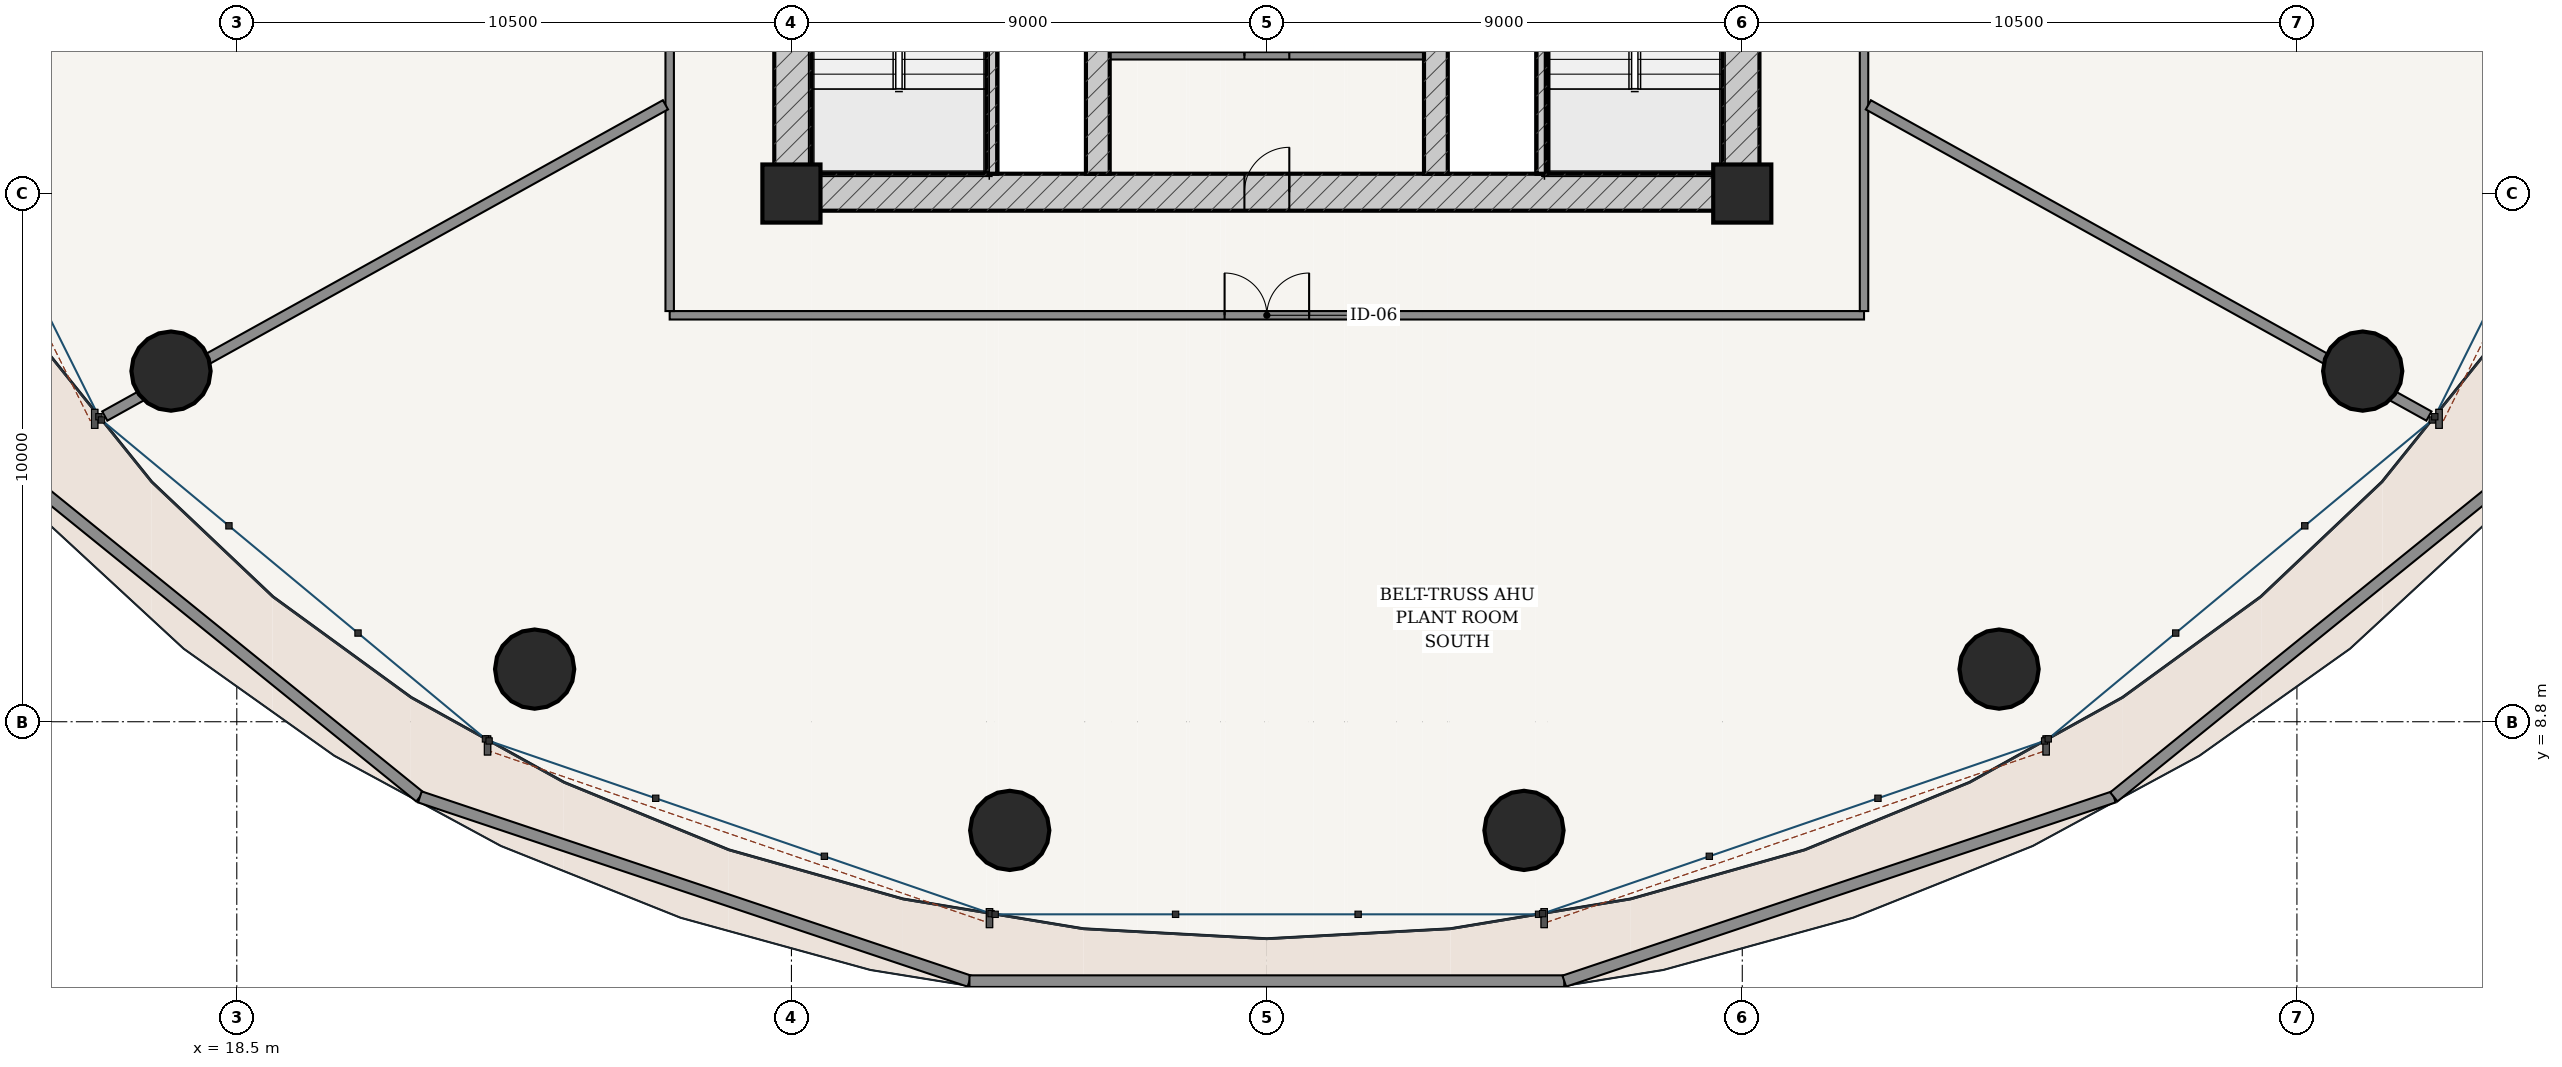
"""IFC4 building model, lengths in metres.
Left out: names, types, materials, properties, quantities, classifications, styles, units other than length and angle.
Written with IfcOpenShell. Run it as: python <this file> out.ifc"""

import sys

from ifc_helpers import new_model, si_unit, direction, frame, frame_2d, origin, origin_2d, place, context, subcontext, project, spatial, rectangle, hollow_circle, extrude, source, transform, mapped, element, fill, save


model = new_model("IFC4")
c1 = context("Model", 3, precision=1e-05, world=origin(), true_north=direction((-0.2419218956, 0.970295726276)))
c2 = subcontext(c1, "Body", "Model", "MODEL_VIEW")
j1 = project(units=[si_unit("LENGTHUNIT", "METRE"), si_unit("PLANEANGLEUNIT", "RADIAN")], contexts=[c1])
p1 = place(None, origin())
s1 = spatial("IfcSite", under=j1, at=p1, CompositionType="ELEMENT")
p2 = place(p1, origin())
s2 = spatial("IfcBuilding", under=s1, at=p2, CompositionType="ELEMENT")
p3 = place(p2, frame((0.0, 0.0, 74.4)))
s3 = spatial("IfcBuildingStorey", under=s2, at=p3, CompositionType="ELEMENT", Elevation=74.4)
for number, where, z_axis, x_axis in (
    (1, (29.0, 18.8, 0.0), (0.0, 0.0, 1.0), (1.0, 0.0, 0.0)),
    (2, (47.0, 18.8, 0.0), (0.0, 0.0, 1.0), (1.0, 0.0, 0.0)),
):
    element("IfcColumn", number, at=place(p3, frame(where, z_axis=z_axis, x_axis=x_axis)), inside=s3, PredefinedType="COLUMN", context=c2, shape_type="SweptSolid", body=[
        extrude(rectangle(XDim=1.1, YDim=1.1, at=origin_2d()), origin(), (0.0, 0.0, 1.0), 5.4),
    ])
p4 = place(p3, frame((28.675, 18.825, 0.0), z_axis=(0.0, 0.0, 1.0), x_axis=(1.0, 0.0, 0.0)))
e3 = element("IfcWall", 3, at=p4, inside=s3, PredefinedType="SHEAR", context=c2, shape_type="SweptSolid", body=[
    extrude(rectangle(XDim=18.65, YDim=0.7, at=frame_2d((9.325, 0.0))), origin(), (0.0, 0.0, 1.0), 5.125),
])
p5 = place(p4, frame((8.9, 0.0, 0.0)))
e4 = element("IfcOpeningElement", 4, at=p5, cuts=e3, PredefinedType="OPENING", context=c2, shape_type="SweptSolid", body=[
    extrude(rectangle(XDim=0.85, YDim=2.1, at=frame_2d((0.425, 1.05))), frame((0.0, 0.36, 0.0), z_axis=(0.0, -1.0, 0.0), x_axis=(1.0, 0.0, 0.0)), (0.0, 0.0, 1.0), 0.72),
])
p6 = place(p3, frame((29.025, 19.175, 0.0), z_axis=(0.0, 0.0, 1.0), x_axis=(0.0, 1.0, 0.0)))
e5 = element("IfcWall", 5, at=p6, inside=s3, PredefinedType="SHEAR", context=c2, shape_type="SweptSolid", body=[
    extrude(rectangle(XDim=15.25, YDim=0.7, at=frame_2d((7.625, 0.0))), origin(), (0.0, 0.0, 1.0), 5.125),
])
p7 = place(p6, frame((9.875, 0.0, 0.0)))
e6 = element("IfcOpeningElement", 6, at=p7, cuts=e5, PredefinedType="OPENING", context=c2, shape_type="SweptSolid", body=[
    extrude(rectangle(XDim=1.5, YDim=2.2, at=frame_2d((0.75, 1.1))), frame((0.0, 0.36, 0.0), z_axis=(0.0, -1.0, 0.0), x_axis=(1.0, 0.0, 0.0)), (0.0, 0.0, 1.0), 0.72),
])
p8 = place(p3, frame((46.975, 19.175, 0.0), z_axis=(0.0, 0.0, 1.0), x_axis=(0.0, 1.0, 0.0)))
e7 = element("IfcWall", 7, at=p8, inside=s3, PredefinedType="SHEAR", context=c2, shape_type="SweptSolid", body=[
    extrude(rectangle(XDim=15.25, YDim=0.7, at=frame_2d((7.625, 0.0))), origin(), (0.0, 0.0, 1.0), 5.125),
])
p9 = place(p8, frame((9.875, 0.0, 0.0)))
e8 = element("IfcOpeningElement", 8, at=p9, cuts=e7, PredefinedType="OPENING", context=c2, shape_type="SweptSolid", body=[
    extrude(rectangle(XDim=1.5, YDim=2.2, at=frame_2d((0.75, 1.1))), frame((0.0, 0.36, 0.0), z_axis=(0.0, -1.0, 0.0), x_axis=(1.0, 0.0, 0.0)), (0.0, 0.0, 1.0), 0.72),
])
for number, where, z_axis, x_axis in (
    (9, (32.795, 19.175, 0.0), (0.0, 0.0, 1.0), (0.0, 1.0, 0.0)),
    (10, (43.205, 19.175, 0.0), (0.0, 0.0, 1.0), (0.0, 1.0, 0.0)),
):
    element("IfcWall", number, at=place(p3, frame(where, z_axis=z_axis, x_axis=x_axis)), inside=s3, PredefinedType="SOLIDWALL", context=c2, shape_type="SweptSolid", body=[
        extrude(rectangle(XDim=7.375, YDim=0.2, at=frame_2d((3.688, 0.0))), origin(), (0.0, 0.0, 1.0), 5.125),
    ])
p10 = place(p3, frame((34.8, 19.175, 0.0), z_axis=(0.0, 0.0, 1.0), x_axis=(0.0, 1.0, 0.0)))
e11 = element("IfcWall", 11, at=p10, inside=s3, PredefinedType="SHEAR", context=c2, shape_type="SweptSolid", body=[
    extrude(rectangle(XDim=15.25, YDim=0.45, at=frame_2d((7.625, 0.0))), origin(), (0.0, 0.0, 1.0), 5.125),
])
p11 = place(p10, frame((7.8, 0.0, 0.0)))
e12 = element("IfcOpeningElement", 12, at=p11, cuts=e11, PredefinedType="OPENING", context=c2, shape_type="SweptSolid", body=[
    extrude(rectangle(XDim=1.05, YDim=2.15, at=frame_2d((0.525, 1.075))), frame((0.0, 0.235, 0.0), z_axis=(0.0, -1.0, 0.0), x_axis=(1.0, 0.0, 0.0)), (0.0, 0.0, 1.0), 0.47),
])
p12 = place(p3, frame((41.2, 19.175, 0.0), z_axis=(0.0, 0.0, 1.0), x_axis=(0.0, 1.0, 0.0)))
e13 = element("IfcWall", 13, at=p12, inside=s3, PredefinedType="SHEAR", context=c2, shape_type="SweptSolid", body=[
    extrude(rectangle(XDim=15.25, YDim=0.45, at=frame_2d((7.625, 0.0))), origin(), (0.0, 0.0, 1.0), 5.125),
])
p13 = place(p12, frame((7.8, 0.0, 0.0)))
e14 = element("IfcOpeningElement", 14, at=p13, cuts=e13, PredefinedType="OPENING", context=c2, shape_type="SweptSolid", body=[
    extrude(rectangle(XDim=1.05, YDim=2.15, at=frame_2d((0.525, 1.075))), frame((0.0, 0.235, 0.0), z_axis=(0.0, -1.0, 0.0), x_axis=(1.0, 0.0, 0.0)), (0.0, 0.0, 1.0), 0.47),
])
for number, where, z_axis, x_axis in (
    (15, (17.255, 15.438, 0.0), (0.0, 0.0, 1.0), (1.0, 0.0, 0.0)),
    (16, (24.138, 9.796, 0.0), (0.0, 0.0, 1.0), (1.0, 0.0, 0.0)),
    (17, (33.133, 6.743, 0.0), (0.0, 0.0, 1.0), (1.0, 0.0, 0.0)),
    (18, (42.867, 6.743, 0.0), (0.0, 0.0, 1.0), (1.0, 0.0, 0.0)),
    (19, (51.862, 9.796, 0.0), (0.0, 0.0, 1.0), (1.0, 0.0, 0.0)),
    (20, (58.745, 15.438, 0.0), (0.0, 0.0, 1.0), (1.0, 0.0, 0.0)),
):
    element("IfcColumn", number, at=place(p3, frame(where, z_axis=z_axis, x_axis=x_axis)), inside=s3, PredefinedType="COLUMN", context=c2, shape_type="SweptSolid", body=[
        extrude(hollow_circle(Radius=0.75, WallThickness=0.045, at=origin_2d()), origin(), (0.0, 0.0, 1.0), 5.4),
    ])
p14 = place(p3, frame((14.004, 13.822, 0.0), z_axis=(0.0, 0.0, 1.0), x_axis=(0.777289269967, -0.629143378567, 0.0)))
e21 = element("IfcWall", 21, at=p14, inside=s3, PredefinedType="PARAPET", context=c2, shape_type="SweptSolid", body=[
    extrude(rectangle(XDim=10.244, YDim=0.22, at=frame_2d((5.122, 0.0))), origin(), (0.0, 0.0, 1.0), 1.15),
])
p15 = place(p3, frame((21.966, 7.377, 0.0), z_axis=(0.0, 0.0, 1.0), x_axis=(0.948127810737, -0.317889374636, 0.0)))
e22 = element("IfcWall", 22, at=p15, inside=s3, PredefinedType="PARAPET", context=c2, shape_type="SweptSolid", body=[
    extrude(rectangle(XDim=10.972, YDim=0.22, at=frame_2d((5.486, 0.0))), origin(), (0.0, 0.0, 1.0), 1.15),
])
p16 = place(p3, frame((32.37, 3.889, 0.0), z_axis=(0.0, 0.0, 1.0), x_axis=(1.0, 0.0, 0.0)))
e23 = element("IfcWall", 23, at=p16, inside=s3, PredefinedType="PARAPET", context=c2, shape_type="SweptSolid", body=[
    extrude(rectangle(XDim=11.261, YDim=0.22, at=frame_2d((5.63, 0.0))), origin(), (0.0, 0.0, 1.0), 1.15),
])
p17 = place(p3, frame((43.63, 3.889, 0.0), z_axis=(0.0, 0.0, 1.0), x_axis=(0.948127810737, 0.317889374636, 0.0)))
e24 = element("IfcWall", 24, at=p17, inside=s3, PredefinedType="PARAPET", context=c2, shape_type="SweptSolid", body=[
    extrude(rectangle(XDim=10.972, YDim=0.22, at=frame_2d((5.486, 0.0))), origin(), (0.0, 0.0, 1.0), 1.15),
])
p18 = place(p3, frame((54.034, 7.377, 0.0), z_axis=(0.0, 0.0, 1.0), x_axis=(0.777289269967, 0.629143378567, 0.0)))
e25 = element("IfcWall", 25, at=p18, inside=s3, PredefinedType="PARAPET", context=c2, shape_type="SweptSolid", body=[
    extrude(rectangle(XDim=10.244, YDim=0.22, at=frame_2d((5.122, 0.0))), origin(), (0.0, 0.0, 1.0), 1.15),
])
p19 = place(p3, frame((35.025, 21.407, 0.0), z_axis=(0.0, 0.0, 1.0), x_axis=(1.0, 0.0, 0.0)))
e26 = element("IfcWall", 26, at=p19, inside=s3, PredefinedType="PARTITIONING", context=c2, shape_type="SweptSolid", body=[
    extrude(rectangle(XDim=5.95, YDim=0.14, at=frame_2d((2.975, 0.0))), origin(), (0.0, 0.0, 1.0), 5.125),
])
p20 = place(p19, frame((2.55, 0.0, 0.0)))
e27 = element("IfcOpeningElement", 27, at=p20, cuts=e26, PredefinedType="OPENING", context=c2, shape_type="SweptSolid", body=[
    extrude(rectangle(XDim=0.85, YDim=2.1, at=frame_2d((0.425, 1.05))), frame((0.0, 0.08, 0.0), z_axis=(0.0, -1.0, 0.0), x_axis=(1.0, 0.0, 0.0)), (0.0, 0.0, 1.0), 0.16),
])
p21 = place(p3, frame((26.695, 16.495, 0.0), z_axis=(0.0, 0.0, 1.0), x_axis=(1.0, 0.0, 0.0)))
e28 = element("IfcWall", 28, at=p21, inside=s3, PredefinedType="PARTITIONING", context=c2, shape_type="SweptSolid", body=[
    extrude(rectangle(XDim=22.61, YDim=0.16, at=frame_2d((11.305, 0.0))), origin(), (0.0, 0.0, 1.0), 4.567),
])
p22 = place(p21, frame((10.505, 0.0, 0.0)))
e29 = element("IfcOpeningElement", 29, at=p22, cuts=e28, PredefinedType="OPENING", context=c2, shape_type="SweptSolid", body=[
    extrude(rectangle(XDim=1.6, YDim=2.25, at=frame_2d((0.8, 1.125))), frame((0.0, 0.09, 0.0), z_axis=(0.0, -1.0, 0.0), x_axis=(1.0, 0.0, 0.0)), (0.0, 0.0, 1.0), 0.18),
])
p23 = place(p3, frame((26.695, 16.575, 0.0), z_axis=(0.0, 0.0, 1.0), x_axis=(0.0, 1.0, 0.0)))
e30 = element("IfcWall", 30, at=p23, inside=s3, PredefinedType="PARTITIONING", context=c2, shape_type="SweptSolid", body=[
    extrude(rectangle(XDim=20.45, YDim=0.16, at=frame_2d((10.225, 0.0))), origin(), (0.0, 0.0, 1.0), 4.567),
])
p24 = place(p23, frame((9.475, 0.0, 0.0)))
e31 = element("IfcOpeningElement", 31, at=p24, cuts=e30, PredefinedType="OPENING", context=c2, shape_type="SweptSolid", body=[
    extrude(rectangle(XDim=1.5, YDim=2.2, at=frame_2d((0.75, 1.1))), frame((0.0, 0.09, 0.0), z_axis=(0.0, -1.0, 0.0), x_axis=(1.0, 0.0, 0.0)), (0.0, 0.0, 1.0), 0.18),
])
p25 = place(p3, frame((49.305, 16.575, 0.0), z_axis=(0.0, 0.0, 1.0), x_axis=(0.0, 1.0, 0.0)))
e32 = element("IfcWall", 32, at=p25, inside=s3, PredefinedType="PARTITIONING", context=c2, shape_type="SweptSolid", body=[
    extrude(rectangle(XDim=20.45, YDim=0.16, at=frame_2d((10.225, 0.0))), origin(), (0.0, 0.0, 1.0), 4.567),
])
p26 = place(p25, frame((9.425, 0.0, 0.0)))
e33 = element("IfcOpeningElement", 33, at=p26, cuts=e32, PredefinedType="OPENING", context=c2, shape_type="SweptSolid", body=[
    extrude(rectangle(XDim=1.6, YDim=2.25, at=frame_2d((0.8, 1.125))), frame((0.0, 0.09, 0.0), z_axis=(0.0, -1.0, 0.0), x_axis=(1.0, 0.0, 0.0)), (0.0, 0.0, 1.0), 0.18),
])
p27 = place(p3, frame((26.615, 20.48, 0.0), z_axis=(0.0, 0.0, 1.0), x_axis=(-0.87431374927, -0.485361172569, 0.0)))
e34 = element("IfcWall", 34, at=p27, inside=s3, PredefinedType="PARTITIONING", context=c2, shape_type="SweptSolid", body=[
    extrude(rectangle(XDim=12.14, YDim=0.2, at=frame_2d((6.07, 0.0))), origin(), (0.0, 0.0, 1.0), 4.567),
])
p28 = place(p3, frame((49.387, 20.479, 0.0), z_axis=(0.0, 0.0, 1.0), x_axis=(0.874314722833, -0.48535941882, 0.0)))
e35 = element("IfcWall", 35, at=p28, inside=s3, PredefinedType="PARTITIONING", context=c2, shape_type="SweptSolid", body=[
    extrude(rectangle(XDim=12.138, YDim=0.2, at=frame_2d((6.069, 0.0))), origin(), (0.0, 0.0, 1.0), 4.567),
])
m1 = source(origin(), c2, "Body", "SweptSolid", [
    extrude(rectangle(XDim=0.85, YDim=2.1, at=frame_2d((0.425, 1.05))), frame((0.0, 0.025, 0.0), z_axis=(0.0, -1.0, 0.0), x_axis=(1.0, 0.0, 0.0)), (0.0, 0.0, 1.0), 0.05),
])
p29 = place(p5, origin())
e36 = element("IfcDoor", 36, at=p29, inside=s3, OperationType="SINGLE_SWING_RIGHT", PredefinedType="DOOR", context=c2, shape_type="MappedRepresentation", body=[
    mapped(m1, transform((0.0, 0.0, 0.0), scale=1.0)),
])
fill(e4, e36)
p30 = place(p20, origin())
e37 = element("IfcDoor", 37, at=p30, inside=s3, OperationType="SINGLE_SWING_LEFT", PredefinedType="DOOR", context=c2, shape_type="MappedRepresentation", body=[
    mapped(m1, transform((0.0, 0.0, 0.0), scale=1.0)),
])
fill(e27, e37)
m2 = source(origin(), c2, "Body", "SweptSolid", [
    extrude(rectangle(XDim=1.6, YDim=2.25, at=frame_2d((0.8, 1.125))), frame((0.0, 0.025, 0.0), z_axis=(0.0, -1.0, 0.0), x_axis=(1.0, 0.0, 0.0)), (0.0, 0.0, 1.0), 0.05),
])
p31 = place(p22, origin())
e38 = element("IfcDoor", 38, at=p31, inside=s3, OperationType="DOUBLE_DOOR_SINGLE_SWING", PredefinedType="DOOR", context=c2, shape_type="MappedRepresentation", body=[
    mapped(m2, transform((0.0, 0.0, 0.0), scale=1.0)),
])
fill(e29, e38)
save(model, sys.argv[1])
